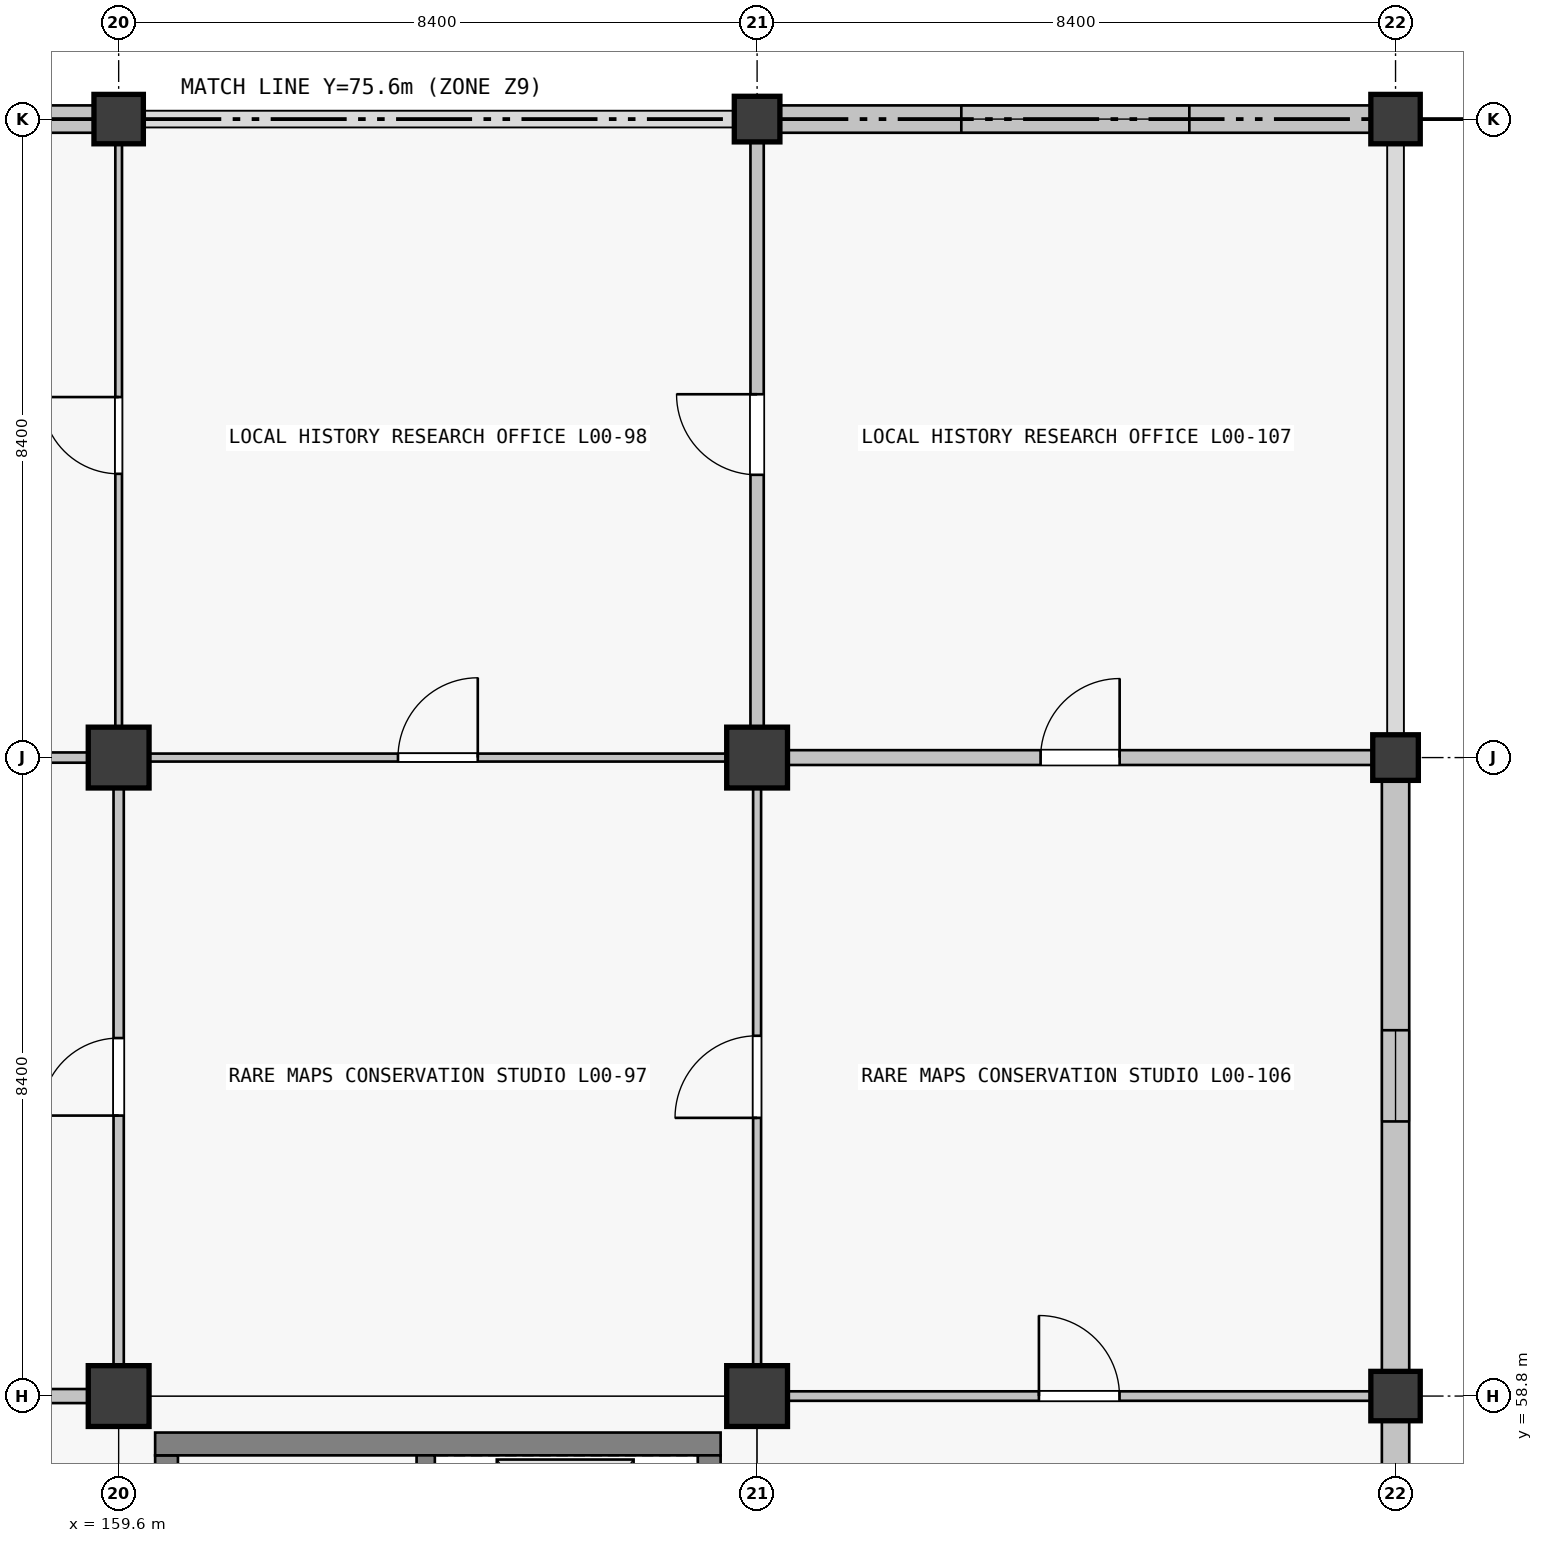
"""IFC4 building model, lengths in metres.
Left out: names, types, materials, properties, quantities, classifications, styles, units other than length and angle.
Written with IfcOpenShell. Run it as: python <this file> out.ifc"""

import sys

from ifc_helpers import new_model, si_unit, direction, frame, frame_2d, origin, origin_2d, place, context, subcontext, project, spatial, rectangle, extrude, element, fill, save


model = new_model("IFC4")
c1 = context("Model", 3, precision=1e-05, world=origin(), true_north=direction((0.0, 1.0)))
c2 = subcontext(c1, "Body", "Model", "MODEL_VIEW")
j1 = project(units=[si_unit("LENGTHUNIT", "METRE"), si_unit("PLANEANGLEUNIT", "RADIAN")], contexts=[c1])
p1 = place(None, origin())
s1 = spatial("IfcSite", under=j1, at=p1, CompositionType="ELEMENT")
p2 = place(p1, origin())
s2 = spatial("IfcBuilding", under=s1, at=p2, CompositionType="ELEMENT")
p3 = place(p2, origin())
s3 = spatial("IfcBuildingStorey", under=s2, at=p3, CompositionType="ELEMENT", Elevation=0.0)
for number, where, z_axis, x_axis in (
    (1, (159.6, 58.8, 0.0), (0.0, 0.0, 1.0), (1.0, 0.0, 0.0)),
    (2, (159.6, 67.2, 0.0), (0.0, 0.0, 1.0), (1.0, 0.0, 0.0)),
):
    element("IfcColumn", number, at=place(p3, frame(where, z_axis=z_axis, x_axis=x_axis)), inside=s3, PredefinedType="COLUMN", context=c2, shape_type="SweptSolid", body=[
        extrude(rectangle(XDim=0.8, YDim=0.8, at=origin_2d()), origin(), (0.0, 0.0, 1.0), 5.76),
    ])
p4 = place(p3, frame((159.6, 75.6, 0.0), z_axis=(0.0, 0.0, 1.0), x_axis=(1.0, 0.0, 0.0)))
e3 = element("IfcColumn", 3, at=p4, inside=s3, PredefinedType="COLUMN", context=c2, shape_type="SweptSolid", body=[
    extrude(rectangle(XDim=0.65, YDim=0.65, at=origin_2d()), origin(), (0.0, 0.0, 1.0), 5.76),
])
for number, where, z_axis, x_axis in (
    (4, (168.0, 58.8, 0.0), (0.0, 0.0, 1.0), (1.0, 0.0, 0.0)),
    (5, (168.0, 67.2, 0.0), (0.0, 0.0, 1.0), (1.0, 0.0, 0.0)),
):
    element("IfcColumn", number, at=place(p3, frame(where, z_axis=z_axis, x_axis=x_axis)), inside=s3, PredefinedType="COLUMN", context=c2, shape_type="SweptSolid", body=[
        extrude(rectangle(XDim=0.8, YDim=0.8, at=origin_2d()), origin(), (0.0, 0.0, 1.0), 5.76),
    ])
p5 = place(p3, frame((168.0, 75.6, 0.0), z_axis=(0.0, 0.0, 1.0), x_axis=(1.0, 0.0, 0.0)))
e6 = element("IfcColumn", 6, at=p5, inside=s3, PredefinedType="COLUMN", context=c2, shape_type="SweptSolid", body=[
    extrude(rectangle(XDim=0.6, YDim=0.6, at=origin_2d()), origin(), (0.0, 0.0, 1.0), 5.76),
])
p6 = place(p3, frame((176.4, 58.8, 0.0), z_axis=(0.0, 0.0, 1.0), x_axis=(1.0, 0.0, 0.0)))
e7 = element("IfcColumn", 7, at=p6, inside=s3, PredefinedType="COLUMN", context=c2, shape_type="SweptSolid", body=[
    extrude(rectangle(XDim=0.65, YDim=0.65, at=origin_2d()), origin(), (0.0, 0.0, 1.0), 5.76),
])
p7 = place(p3, frame((176.4, 67.2, 0.0), z_axis=(0.0, 0.0, 1.0), x_axis=(1.0, 0.0, 0.0)))
e8 = element("IfcColumn", 8, at=p7, inside=s3, PredefinedType="COLUMN", context=c2, shape_type="SweptSolid", body=[
    extrude(rectangle(XDim=0.6, YDim=0.6, at=origin_2d()), origin(), (0.0, 0.0, 1.0), 5.76),
])
p8 = place(p3, frame((176.4, 75.6, 0.0), z_axis=(0.0, 0.0, 1.0), x_axis=(1.0, 0.0, 0.0)))
e9 = element("IfcColumn", 9, at=p8, inside=s3, PredefinedType="COLUMN", context=c2, shape_type="SweptSolid", body=[
    extrude(rectangle(XDim=0.65, YDim=0.65, at=origin_2d()), origin(), (0.0, 0.0, 1.0), 5.76),
])
p9 = place(p3, frame((151.501, 75.6, 0.0), z_axis=(0.0, 0.0, 1.0), x_axis=(1.0, 0.0, 0.0)))
e10 = element("IfcWall", 10, at=p9, inside=s3, PredefinedType="SOLIDWALL", context=c2, shape_type="SweptSolid", body=[
    extrude(rectangle(XDim=7.773, YDim=0.36, at=frame_2d((3.886, 0.0))), origin(), (0.0, 0.0, 1.0), 4.7),
])
p10 = place(p9, frame((2.686, 0.0, 0.9)))
e11 = element("IfcOpeningElement", 11, at=p10, cuts=e10, PredefinedType="OPENING", context=c2, shape_type="SweptSolid", body=[
    extrude(rectangle(XDim=2.4, YDim=1.8, at=frame_2d((1.2, 0.9))), frame((0.0, 0.18, 0.0), z_axis=(0.0, -1.0, 0.0), x_axis=(1.0, 0.0, 0.0)), (0.0, 0.0, 1.0), 0.36),
])
p11 = place(p3, frame((176.4, 58.474, 0.0), z_axis=(0.0, 0.0, 1.0), x_axis=(0.0, -1.0, 0.0)))
e12 = element("IfcWall", 12, at=p11, inside=s3, PredefinedType="SOLIDWALL", context=c2, shape_type="SweptSolid", body=[
    extrude(rectangle(XDim=7.773, YDim=0.36, at=frame_2d((3.887, 0.0))), origin(), (0.0, 0.0, 1.0), 4.7),
])
p12 = place(p11, frame((2.886, 0.0, 0.0)))
e13 = element("IfcOpeningElement", 13, at=p12, cuts=e12, PredefinedType="OPENING", context=c2, shape_type="SweptSolid", body=[
    extrude(rectangle(XDim=2.0, YDim=2.25, at=frame_2d((1.0, 1.125))), frame((0.0, 0.18, 0.0), z_axis=(0.0, -1.0, 0.0), x_axis=(1.0, 0.0, 0.0)), (0.0, 0.0, 1.0), 0.36),
])
p13 = place(p11, frame((5.624, 0.0, 0.0)))
e14 = element("IfcOpeningElement", 14, at=p13, cuts=e12, PredefinedType="OPENING", context=c2, shape_type="SweptSolid", body=[
    extrude(rectangle(XDim=2.0, YDim=2.25, at=frame_2d((1.0, 1.125))), frame((0.0, 0.18, 0.0), z_axis=(0.0, -1.0, 0.0), x_axis=(1.0, 0.0, 0.0)), (0.0, 0.0, 1.0), 0.36),
])
p14 = place(p3, frame((176.4, 66.899, 0.0), z_axis=(0.0, 0.0, 1.0), x_axis=(0.0, -1.0, 0.0)))
e15 = element("IfcWall", 15, at=p14, inside=s3, PredefinedType="SOLIDWALL", context=c2, shape_type="SweptSolid", body=[
    extrude(rectangle(XDim=7.773, YDim=0.36, at=frame_2d((3.886, 0.0))), origin(), (0.0, 0.0, 1.0), 4.7),
])
p15 = place(p14, frame((3.286, 0.0, 0.9)))
e16 = element("IfcOpeningElement", 16, at=p15, cuts=e15, PredefinedType="OPENING", context=c2, shape_type="SweptSolid", body=[
    extrude(rectangle(XDim=1.2, YDim=2.1, at=frame_2d((0.6, 1.05))), frame((0.0, 0.18, 0.0), z_axis=(0.0, -1.0, 0.0), x_axis=(1.0, 0.0, 0.0)), (0.0, 0.0, 1.0), 0.36),
])
p16 = place(p3, frame((168.301, 75.6, 0.0), z_axis=(0.0, 0.0, 1.0), x_axis=(1.0, 0.0, 0.0)))
e17 = element("IfcWall", 17, at=p16, inside=s3, PredefinedType="SOLIDWALL", context=c2, shape_type="SweptSolid", body=[
    extrude(rectangle(XDim=7.773, YDim=0.36, at=frame_2d((3.886, 0.0))), origin(), (0.0, 0.0, 1.0), 4.7),
])
p17 = place(p16, frame((2.386, 0.0, 0.9)))
e18 = element("IfcOpeningElement", 18, at=p17, cuts=e17, PredefinedType="OPENING", context=c2, shape_type="SweptSolid", body=[
    extrude(rectangle(XDim=3.0, YDim=1.2, at=frame_2d((1.5, 0.6))), frame((0.0, 0.18, 0.0), z_axis=(0.0, -1.0, 0.0), x_axis=(1.0, 0.0, 0.0)), (0.0, 0.0, 1.0), 0.36),
])
p18 = place(p3, frame((160.23, 51.18, 0.0), z_axis=(0.0, 0.0, 1.0), x_axis=(0.0, 1.0, 0.0)))
e19 = element("IfcWall", 19, at=p18, inside=s3, PredefinedType="SHEAR", context=c2, shape_type="SweptSolid", body=[
    extrude(rectangle(XDim=6.84, YDim=0.3, at=frame_2d((3.42, 0.0))), origin(), (0.0, 0.0, 1.0), 5.76),
])
p19 = place(p3, frame((160.08, 58.17, 0.0), z_axis=(0.0, 0.0, 1.0), x_axis=(1.0, 0.0, 0.0)))
e20 = element("IfcWall", 20, at=p19, inside=s3, PredefinedType="SHEAR", context=c2, shape_type="SweptSolid", body=[
    extrude(rectangle(XDim=7.44, YDim=0.3, at=frame_2d((3.72, 0.0))), origin(), (0.0, 0.0, 1.0), 5.76),
])
p20 = place(p3, frame((167.37, 58.02, 0.0), z_axis=(0.0, 0.0, 1.0), x_axis=(0.0, -1.0, 0.0)))
e21 = element("IfcWall", 21, at=p20, inside=s3, PredefinedType="SHEAR", context=c2, shape_type="SweptSolid", body=[
    extrude(rectangle(XDim=6.84, YDim=0.3, at=frame_2d((3.42, 0.0))), origin(), (0.0, 0.0, 1.0), 5.76),
])
p21 = place(p20, frame((5.12, 0.0, 0.0)))
e22 = element("IfcOpeningElement", 22, at=p21, cuts=e21, PredefinedType="OPENING", context=c2, shape_type="SweptSolid", body=[
    extrude(rectangle(XDim=1.5, YDim=2.15, at=frame_2d((0.75, 1.075))), frame((0.0, 0.15, 0.0), z_axis=(0.0, -1.0, 0.0), x_axis=(1.0, 0.0, 0.0)), (0.0, 0.0, 1.0), 0.3),
])
p22 = place(p3, frame((163.64, 51.18, 0.0), z_axis=(0.0, 0.0, 1.0), x_axis=(0.0, 1.0, 0.0)))
e23 = element("IfcWall", 23, at=p22, inside=s3, PredefinedType="SHEAR", context=c2, shape_type="SweptSolid", body=[
    extrude(rectangle(XDim=6.84, YDim=0.24, at=frame_2d((3.42, 0.0))), origin(), (0.0, 0.0, 1.0), 5.76),
])
p23 = place(p22, frame((0.12, 0.0, 0.0)))
e24 = element("IfcOpeningElement", 24, at=p23, cuts=e23, PredefinedType="OPENING", context=c2, shape_type="SweptSolid", body=[
    extrude(rectangle(XDim=1.0, YDim=2.15, at=frame_2d((0.5, 1.075))), frame((0.0, 0.12, 0.0), z_axis=(0.0, -1.0, 0.0), x_axis=(1.0, 0.0, 0.0)), (0.0, 0.0, 1.0), 0.24),
])
p24 = place(p3, frame((151.602, 58.8, 0.0), z_axis=(0.0, 0.0, 1.0), x_axis=(1.0, 0.0, 0.0)))
e25 = element("IfcWall", 25, at=p24, inside=s3, PredefinedType="PARTITIONING", context=c2, shape_type="SweptSolid", body=[
    extrude(rectangle(XDim=7.596, YDim=0.185, at=frame_2d((3.798, 0.0))), origin(), (0.0, 0.0, 1.0), 3.66),
])
p25 = place(p24, frame((3.318, 0.0, 0.0)))
e26 = element("IfcOpeningElement", 26, at=p25, cuts=e25, PredefinedType="OPENING", context=c2, shape_type="SweptSolid", body=[
    extrude(rectangle(XDim=0.96, YDim=2.18, at=frame_2d((0.48, 1.09))), frame((0.0, 0.093, 0.0), z_axis=(0.0, -1.0, 0.0), x_axis=(1.0, 0.0, 0.0)), (0.0, 0.0, 1.0), 0.185),
])
p26 = place(p3, frame((151.602, 67.2, 0.0), z_axis=(0.0, 0.0, 1.0), x_axis=(1.0, 0.0, 0.0)))
e27 = element("IfcWall", 27, at=p26, inside=s3, PredefinedType="PARTITIONING", context=c2, shape_type="SweptSolid", body=[
    extrude(rectangle(XDim=7.596, YDim=0.135, at=frame_2d((3.798, 0.0))), origin(), (0.0, 0.0, 1.0), 3.66),
])
p27 = place(p26, frame((3.328, 0.0, 0.0)))
e28 = element("IfcOpeningElement", 28, at=p27, cuts=e27, PredefinedType="OPENING", context=c2, shape_type="SweptSolid", body=[
    extrude(rectangle(XDim=0.94, YDim=2.15, at=frame_2d((0.47, 1.075))), frame((0.0, 0.067, 0.0), z_axis=(0.0, -1.0, 0.0), x_axis=(1.0, 0.0, 0.0)), (0.0, 0.0, 1.0), 0.135),
])
p28 = place(p3, frame((160.002, 67.2, 0.0), z_axis=(0.0, 0.0, 1.0), x_axis=(1.0, 0.0, 0.0)))
e29 = element("IfcWall", 29, at=p28, inside=s3, PredefinedType="PARTITIONING", context=c2, shape_type="SweptSolid", body=[
    extrude(rectangle(XDim=7.596, YDim=0.105, at=frame_2d((3.798, 0.0))), origin(), (0.0, 0.0, 1.0), 3.66),
])
p29 = place(p28, frame((3.273, 0.0, 0.0)))
e30 = element("IfcOpeningElement", 30, at=p29, cuts=e29, PredefinedType="OPENING", context=c2, shape_type="SweptSolid", body=[
    extrude(rectangle(XDim=1.05, YDim=2.12, at=frame_2d((0.525, 1.06))), frame((0.0, 0.052, 0.0), z_axis=(0.0, -1.0, 0.0), x_axis=(1.0, 0.0, 0.0)), (0.0, 0.0, 1.0), 0.105),
])
p30 = place(p3, frame((168.402, 58.8, 0.0), z_axis=(0.0, 0.0, 1.0), x_axis=(1.0, 0.0, 0.0)))
e31 = element("IfcWall", 31, at=p30, inside=s3, PredefinedType="PARTITIONING", context=c2, shape_type="SweptSolid", body=[
    extrude(rectangle(XDim=7.671, YDim=0.125, at=frame_2d((3.835, 0.0))), origin(), (0.0, 0.0, 1.0), 3.66),
])
p31 = place(p30, frame((3.306, 0.0, 0.0)))
e32 = element("IfcOpeningElement", 32, at=p31, cuts=e31, PredefinedType="OPENING", context=c2, shape_type="SweptSolid", body=[
    extrude(rectangle(XDim=1.06, YDim=2.25, at=frame_2d((0.53, 1.125))), frame((0.0, 0.062, 0.0), z_axis=(0.0, -1.0, 0.0), x_axis=(1.0, 0.0, 0.0)), (0.0, 0.0, 1.0), 0.125),
])
p32 = place(p3, frame((168.402, 67.2, 0.0), z_axis=(0.0, 0.0, 1.0), x_axis=(1.0, 0.0, 0.0)))
e33 = element("IfcWall", 33, at=p32, inside=s3, PredefinedType="PARTITIONING", context=c2, shape_type="SweptSolid", body=[
    extrude(rectangle(XDim=7.696, YDim=0.195, at=frame_2d((3.848, 0.0))), origin(), (0.0, 0.0, 1.0), 3.66),
])
p33 = place(p32, frame((3.328, 0.0, 0.0)))
e34 = element("IfcOpeningElement", 34, at=p33, cuts=e33, PredefinedType="OPENING", context=c2, shape_type="SweptSolid", body=[
    extrude(rectangle(XDim=1.04, YDim=2.2, at=frame_2d((0.52, 1.1))), frame((0.0, 0.098, 0.0), z_axis=(0.0, -1.0, 0.0), x_axis=(1.0, 0.0, 0.0)), (0.0, 0.0, 1.0), 0.195),
])
p34 = place(p3, frame((159.6, 59.202, 0.0), z_axis=(0.0, 0.0, 1.0), x_axis=(0.0, 1.0, 0.0)))
e35 = element("IfcWall", 35, at=p34, inside=s3, PredefinedType="PARTITIONING", context=c2, shape_type="SweptSolid", body=[
    extrude(rectangle(XDim=7.596, YDim=0.135, at=frame_2d((3.798, 0.0))), origin(), (0.0, 0.0, 1.0), 3.66),
])
p35 = place(p34, frame((3.288, 0.0, 0.0)))
e36 = element("IfcOpeningElement", 36, at=p35, cuts=e35, PredefinedType="OPENING", context=c2, shape_type="SweptSolid", body=[
    extrude(rectangle(XDim=1.02, YDim=2.2, at=frame_2d((0.51, 1.1))), frame((0.0, 0.067, 0.0), z_axis=(0.0, -1.0, 0.0), x_axis=(1.0, 0.0, 0.0)), (0.0, 0.0, 1.0), 0.135),
])
p36 = place(p3, frame((159.6, 67.602, 0.0), z_axis=(0.0, 0.0, 1.0), x_axis=(0.0, 1.0, 0.0)))
e37 = element("IfcWall", 37, at=p36, inside=s3, PredefinedType="PARTITIONING", context=c2, shape_type="SweptSolid", body=[
    extrude(rectangle(XDim=7.671, YDim=0.088, at=frame_2d((3.835, 0.0))), origin(), (0.0, 0.0, 1.0), 3.66),
])
p37 = place(p36, frame((3.331, 0.0, 0.0)))
e38 = element("IfcOpeningElement", 38, at=p37, cuts=e37, PredefinedType="OPENING", context=c2, shape_type="SweptSolid", body=[
    extrude(rectangle(XDim=1.01, YDim=2.12, at=frame_2d((0.505, 1.06))), frame((0.0, 0.044, 0.0), z_axis=(0.0, -1.0, 0.0), x_axis=(1.0, 0.0, 0.0)), (0.0, 0.0, 1.0), 0.088),
])
p38 = place(p3, frame((168.0, 59.202, 0.0), z_axis=(0.0, 0.0, 1.0), x_axis=(0.0, 1.0, 0.0)))
e39 = element("IfcWall", 39, at=p38, inside=s3, PredefinedType="PARTITIONING", context=c2, shape_type="SweptSolid", body=[
    extrude(rectangle(XDim=7.596, YDim=0.105, at=frame_2d((3.798, 0.0))), origin(), (0.0, 0.0, 1.0), 3.66),
])
p39 = place(p38, frame((3.258, 0.0, 0.0)))
e40 = element("IfcOpeningElement", 40, at=p39, cuts=e39, PredefinedType="OPENING", context=c2, shape_type="SweptSolid", body=[
    extrude(rectangle(XDim=1.08, YDim=2.25, at=frame_2d((0.54, 1.125))), frame((0.0, 0.052, 0.0), z_axis=(0.0, -1.0, 0.0), x_axis=(1.0, 0.0, 0.0)), (0.0, 0.0, 1.0), 0.105),
])
p40 = place(p3, frame((168.0, 67.602, 0.0), z_axis=(0.0, 0.0, 1.0), x_axis=(0.0, 1.0, 0.0)))
e41 = element("IfcWall", 41, at=p40, inside=s3, PredefinedType="PARTITIONING", context=c2, shape_type="SweptSolid", body=[
    extrude(rectangle(XDim=7.696, YDim=0.175, at=frame_2d((3.848, 0.0))), origin(), (0.0, 0.0, 1.0), 3.66),
])
p41 = place(p40, frame((3.318, 0.0, 0.0)))
e42 = element("IfcOpeningElement", 42, at=p41, cuts=e41, PredefinedType="OPENING", context=c2, shape_type="SweptSolid", body=[
    extrude(rectangle(XDim=1.06, YDim=2.25, at=frame_2d((0.53, 1.125))), frame((0.0, 0.087, 0.0), z_axis=(0.0, -1.0, 0.0), x_axis=(1.0, 0.0, 0.0)), (0.0, 0.0, 1.0), 0.175),
])
p42 = place(p15, origin())
e43 = element("IfcWindow", 43, at=p42, inside=s3, PartitioningType="SINGLE_PANEL", PredefinedType="WINDOW", context=c2, shape_type="SweptSolid", body=[
    extrude(rectangle(XDim=1.2, YDim=2.1, at=frame_2d((0.6, 1.05))), frame((0.0, 0.03, 0.0), z_axis=(0.0, -1.0, 0.0), x_axis=(1.0, 0.0, 0.0)), (0.0, 0.0, 1.0), 0.06),
])
fill(e16, e43)
p43 = place(p17, origin())
e44 = element("IfcWindow", 44, at=p43, inside=s3, PartitioningType="SINGLE_PANEL", PredefinedType="WINDOW", context=c2, shape_type="SweptSolid", body=[
    extrude(rectangle(XDim=3.0, YDim=1.2, at=frame_2d((1.5, 0.6))), frame((0.0, 0.03, 0.0), z_axis=(0.0, -1.0, 0.0), x_axis=(1.0, 0.0, 0.0)), (0.0, 0.0, 1.0), 0.06),
])
fill(e18, e44)
p44 = place(p29, origin())
e45 = element("IfcDoor", 45, at=p44, inside=s3, OperationType="SINGLE_SWING_RIGHT", PredefinedType="DOOR", context=c2, shape_type="SweptSolid", body=[
    extrude(rectangle(XDim=1.05, YDim=2.12, at=frame_2d((0.525, 1.06))), frame((0.0, 0.025, 0.0), z_axis=(0.0, -1.0, 0.0), x_axis=(1.0, 0.0, 0.0)), (0.0, 0.0, 1.0), 0.05),
])
fill(e30, e45)
p45 = place(p31, origin())
e46 = element("IfcDoor", 46, at=p45, inside=s3, OperationType="SINGLE_SWING_LEFT", PredefinedType="DOOR", context=c2, shape_type="SweptSolid", body=[
    extrude(rectangle(XDim=1.06, YDim=2.25, at=frame_2d((0.53, 1.125))), frame((0.0, 0.025, 0.0), z_axis=(0.0, -1.0, 0.0), x_axis=(1.0, 0.0, 0.0)), (0.0, 0.0, 1.0), 0.05),
])
fill(e32, e46)
p46 = place(p33, origin())
e47 = element("IfcDoor", 47, at=p46, inside=s3, OperationType="SINGLE_SWING_RIGHT", PredefinedType="DOOR", context=c2, shape_type="SweptSolid", body=[
    extrude(rectangle(XDim=1.04, YDim=2.2, at=frame_2d((0.52, 1.1))), frame((0.0, 0.025, 0.0), z_axis=(0.0, -1.0, 0.0), x_axis=(1.0, 0.0, 0.0)), (0.0, 0.0, 1.0), 0.05),
])
fill(e34, e47)
p47 = place(p35, origin())
e48 = element("IfcDoor", 48, at=p47, inside=s3, OperationType="SINGLE_SWING_LEFT", PredefinedType="DOOR", context=c2, shape_type="SweptSolid", body=[
    extrude(rectangle(XDim=1.02, YDim=2.2, at=frame_2d((0.51, 1.1))), frame((0.0, 0.025, 0.0), z_axis=(0.0, -1.0, 0.0), x_axis=(1.0, 0.0, 0.0)), (0.0, 0.0, 1.0), 0.05),
])
fill(e36, e48)
p48 = place(p37, origin())
e49 = element("IfcDoor", 49, at=p48, inside=s3, OperationType="SINGLE_SWING_RIGHT", PredefinedType="DOOR", context=c2, shape_type="SweptSolid", body=[
    extrude(rectangle(XDim=1.01, YDim=2.12, at=frame_2d((0.505, 1.06))), frame((0.0, 0.025, 0.0), z_axis=(0.0, -1.0, 0.0), x_axis=(1.0, 0.0, 0.0)), (0.0, 0.0, 1.0), 0.05),
])
fill(e38, e49)
p49 = place(p39, origin())
e50 = element("IfcDoor", 50, at=p49, inside=s3, OperationType="SINGLE_SWING_LEFT", PredefinedType="DOOR", context=c2, shape_type="SweptSolid", body=[
    extrude(rectangle(XDim=1.08, YDim=2.25, at=frame_2d((0.54, 1.125))), frame((0.0, 0.025, 0.0), z_axis=(0.0, -1.0, 0.0), x_axis=(1.0, 0.0, 0.0)), (0.0, 0.0, 1.0), 0.05),
])
fill(e40, e50)
p50 = place(p41, origin())
e51 = element("IfcDoor", 51, at=p50, inside=s3, OperationType="SINGLE_SWING_RIGHT", PredefinedType="DOOR", context=c2, shape_type="SweptSolid", body=[
    extrude(rectangle(XDim=1.06, YDim=2.25, at=frame_2d((0.53, 1.125))), frame((0.0, 0.025, 0.0), z_axis=(0.0, -1.0, 0.0), x_axis=(1.0, 0.0, 0.0)), (0.0, 0.0, 1.0), 0.05),
])
fill(e42, e51)
save(model, sys.argv[1])
